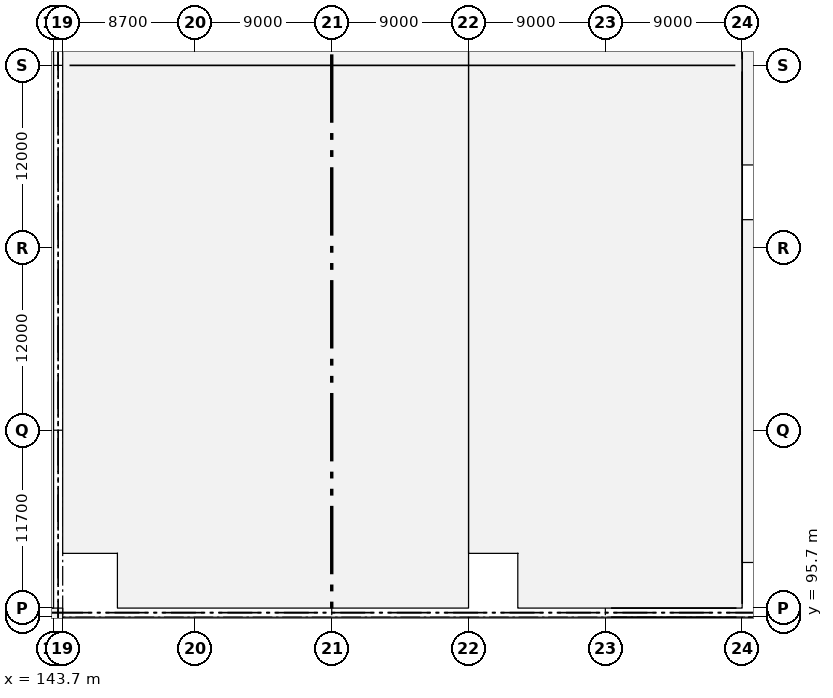
"""IFC4 building model, lengths in metres.
Left out: names, types, materials, properties, quantities, classifications, styles, units other than length and angle.
Written with IfcOpenShell. Run it as: python <this file> out.ifc"""

import sys

from ifc_helpers import new_model, si_unit, direction, frame, frame_2d, origin, origin_2d, place, context, subcontext, project, spatial, rectangle, extrude, element, fill, save


model = new_model("IFC4")
c1 = context("Model", 3, precision=1e-05, world=origin(), true_north=direction((0.0, 1.0)))
c2 = subcontext(c1, "Body", "Model", "MODEL_VIEW")
j1 = project(units=[si_unit("LENGTHUNIT", "METRE"), si_unit("PLANEANGLEUNIT", "RADIAN")], contexts=[c1])
p1 = place(None, origin())
s1 = spatial("IfcSite", under=j1, at=p1, CompositionType="ELEMENT")
p2 = place(p1, origin())
s2 = spatial("IfcBuilding", under=s1, at=p2, CompositionType="ELEMENT")
p3 = place(p2, origin())
s3 = spatial("IfcBuildingStorey", under=s2, at=p3, CompositionType="ELEMENT", Elevation=0.0)
p4 = place(p3, frame((143.7, 96.3, -0.5), z_axis=(0.0, 0.0, 1.0), x_axis=(1.0, 0.0, 0.0)))
e1 = element("IfcColumn", 1, at=p4, inside=s3, PredefinedType="COLUMN", context=c2, shape_type="SweptSolid", body=[
    extrude(rectangle(XDim=0.55, YDim=0.55, at=origin_2d()), origin(), (0.0, 0.0, 1.0), 6.8),
])
p5 = place(p3, frame((143.7, 132.0, -0.5), z_axis=(0.0, 0.0, 1.0), x_axis=(1.0, 0.0, 0.0)))
e2 = element("IfcColumn", 2, at=p5, inside=s3, PredefinedType="COLUMN", context=c2, shape_type="SweptSolid", body=[
    extrude(rectangle(XDim=0.55, YDim=0.75, at=origin_2d()), origin(), (0.0, 0.0, 1.0), 6.8),
])
for number, where, z_axis, x_axis in (
    (3, (144.3, 95.7, -0.5), (0.0, 0.0, 1.0), (1.0, 0.0, 0.0)),
    (4, (144.3, 96.3, -0.5), (0.0, 0.0, 1.0), (1.0, 0.0, 0.0)),
):
    element("IfcColumn", number, at=place(p3, frame(where, z_axis=z_axis, x_axis=x_axis)), inside=s3, PredefinedType="COLUMN", context=c2, shape_type="SweptSolid", body=[
        extrude(rectangle(XDim=0.55, YDim=0.55, at=origin_2d()), origin(), (0.0, 0.0, 1.0), 6.8),
    ])
p6 = place(p3, frame((144.3, 132.0, -0.5), z_axis=(0.0, 0.0, 1.0), x_axis=(1.0, 0.0, 0.0)))
e5 = element("IfcColumn", 5, at=p6, inside=s3, PredefinedType="COLUMN", context=c2, shape_type="SweptSolid", body=[
    extrude(rectangle(XDim=0.55, YDim=0.75, at=origin_2d()), origin(), (0.0, 0.0, 1.0), 6.8),
])
p7 = place(p3, frame((153.0, 96.3, -0.5), z_axis=(0.0, 0.0, 1.0), x_axis=(1.0, 0.0, 0.0)))
e6 = element("IfcColumn", 6, at=p7, inside=s3, PredefinedType="COLUMN", context=c2, shape_type="SweptSolid", body=[
    extrude(rectangle(XDim=0.75, YDim=0.55, at=origin_2d()), origin(), (0.0, 0.0, 1.0), 6.8),
])
p8 = place(p3, frame((153.0, 132.0, -0.5), z_axis=(0.0, 0.0, 1.0), x_axis=(1.0, 0.0, 0.0)))
e7 = element("IfcColumn", 7, at=p8, inside=s3, PredefinedType="COLUMN", context=c2, shape_type="SweptSolid", body=[
    extrude(rectangle(XDim=0.8, YDim=0.8, at=origin_2d()), origin(), (0.0, 0.0, 1.0), 6.8),
])
p9 = place(p3, frame((162.0, 96.3, -0.5), z_axis=(0.0, 0.0, 1.0), x_axis=(1.0, 0.0, 0.0)))
e8 = element("IfcColumn", 8, at=p9, inside=s3, PredefinedType="COLUMN", context=c2, shape_type="SweptSolid", body=[
    extrude(rectangle(XDim=0.75, YDim=0.55, at=origin_2d()), origin(), (0.0, 0.0, 1.0), 6.8),
])
p10 = place(p3, frame((162.0, 132.0, -0.5), z_axis=(0.0, 0.0, 1.0), x_axis=(1.0, 0.0, 0.0)))
e9 = element("IfcColumn", 9, at=p10, inside=s3, PredefinedType="COLUMN", context=c2, shape_type="SweptSolid", body=[
    extrude(rectangle(XDim=0.8, YDim=0.8, at=origin_2d()), origin(), (0.0, 0.0, 1.0), 6.8),
])
p11 = place(p3, frame((171.0, 96.3, -0.5), z_axis=(0.0, 0.0, 1.0), x_axis=(1.0, 0.0, 0.0)))
e10 = element("IfcColumn", 10, at=p11, inside=s3, PredefinedType="COLUMN", context=c2, shape_type="SweptSolid", body=[
    extrude(rectangle(XDim=0.75, YDim=0.55, at=origin_2d()), origin(), (0.0, 0.0, 1.0), 6.8),
])
p12 = place(p3, frame((171.0, 132.0, -0.5), z_axis=(0.0, 0.0, 1.0), x_axis=(1.0, 0.0, 0.0)))
e11 = element("IfcColumn", 11, at=p12, inside=s3, PredefinedType="COLUMN", context=c2, shape_type="SweptSolid", body=[
    extrude(rectangle(XDim=0.8, YDim=0.8, at=origin_2d()), origin(), (0.0, 0.0, 1.0), 6.8),
])
for number, where, z_axis, x_axis in (
    (12, (180.0, 95.7, -0.5), (0.0, 0.0, 1.0), (1.0, 0.0, 0.0)),
    (13, (180.0, 96.3, -0.5), (0.0, 0.0, 1.0), (1.0, 0.0, 0.0)),
):
    element("IfcColumn", number, at=place(p3, frame(where, z_axis=z_axis, x_axis=x_axis)), inside=s3, PredefinedType="COLUMN", context=c2, shape_type="SweptSolid", body=[
        extrude(rectangle(XDim=0.75, YDim=0.55, at=origin_2d()), origin(), (0.0, 0.0, 1.0), 6.8),
    ])
p13 = place(p3, frame((180.0, 132.0, -0.5), z_axis=(0.0, 0.0, 1.0), x_axis=(1.0, 0.0, 0.0)))
e14 = element("IfcColumn", 14, at=p13, inside=s3, PredefinedType="COLUMN", context=c2, shape_type="SweptSolid", body=[
    extrude(rectangle(XDim=0.8, YDim=0.8, at=origin_2d()), origin(), (0.0, 0.0, 1.0), 6.8),
])
for number, where, z_axis, x_axis in (
    (15, (189.0, 95.7, -0.5), (0.0, 0.0, 1.0), (1.0, 0.0, 0.0)),
    (16, (189.0, 96.3, -0.5), (0.0, 0.0, 1.0), (1.0, 0.0, 0.0)),
):
    element("IfcColumn", number, at=place(p3, frame(where, z_axis=z_axis, x_axis=x_axis)), inside=s3, PredefinedType="COLUMN", context=c2, shape_type="SweptSolid", body=[
        extrude(rectangle(XDim=0.75, YDim=0.55, at=origin_2d()), origin(), (0.0, 0.0, 1.0), 6.8),
    ])
p14 = place(p3, frame((189.0, 132.0, -0.5), z_axis=(0.0, 0.0, 1.0), x_axis=(1.0, 0.0, 0.0)))
e17 = element("IfcColumn", 17, at=p14, inside=s3, PredefinedType="COLUMN", context=c2, shape_type="SweptSolid", body=[
    extrude(rectangle(XDim=0.8, YDim=0.8, at=origin_2d()), origin(), (0.0, 0.0, 1.0), 6.8),
])
for number, where, z_axis, x_axis in (
    (18, (153.0, 108.0, -0.5), (0.0, 0.0, 1.0), (1.0, 0.0, 0.0)),
    (19, (171.0, 108.0, -0.5), (0.0, 0.0, 1.0), (1.0, 0.0, 0.0)),
    (20, (153.0, 120.0, -0.5), (0.0, 0.0, 1.0), (1.0, 0.0, 0.0)),
    (21, (171.0, 120.0, -0.5), (0.0, 0.0, 1.0), (1.0, 0.0, 0.0)),
    (22, (144.3, 108.0, -0.5), (0.0, 0.0, 1.0), (1.0, 0.0, 0.0)),
    (23, (144.3, 120.0, -0.5), (0.0, 0.0, 1.0), (1.0, 0.0, 0.0)),
    (24, (180.0, 108.0, -0.5), (0.0, 0.0, 1.0), (1.0, 0.0, 0.0)),
    (25, (180.0, 120.0, -0.5), (0.0, 0.0, 1.0), (1.0, 0.0, 0.0)),
):
    element("IfcColumn", number, at=place(p3, frame(where, z_axis=z_axis, x_axis=x_axis)), inside=s3, PredefinedType="COLUMN", context=c2, shape_type="SweptSolid", body=[
        extrude(rectangle(XDim=0.75, YDim=0.75, at=origin_2d()), origin(), (0.0, 0.0, 1.0), 6.8),
    ])
p15 = place(p3, frame((180.375, 96.3, 0.0), z_axis=(0.0, 0.0, 1.0), x_axis=(1.0, 0.0, 0.0)))
e26 = element("IfcWall", 26, at=p15, inside=s3, PredefinedType="SOLIDWALL", context=c2, shape_type="SweptSolid", body=[
    extrude(rectangle(XDim=8.25, YDim=0.34, at=frame_2d((4.125, 0.0))), origin(), (0.0, 0.0, 1.0), 5.1),
])
p16 = place(p15, frame((1.55, 0.0, 0.9)))
e27 = element("IfcOpeningElement", 27, at=p16, cuts=e26, PredefinedType="OPENING", context=c2, shape_type="SweptSolid", body=[
    extrude(rectangle(XDim=2.4, YDim=3.5, at=frame_2d((1.2, 1.75))), frame((0.0, 0.18, 0.0), z_axis=(0.0, -1.0, 0.0), x_axis=(1.0, 0.0, 0.0)), (0.0, 0.0, 1.0), 0.36),
])
p17 = place(p15, frame((4.3, 0.0, 0.9)))
e28 = element("IfcOpeningElement", 28, at=p17, cuts=e26, PredefinedType="OPENING", context=c2, shape_type="SweptSolid", body=[
    extrude(rectangle(XDim=2.4, YDim=3.5, at=frame_2d((1.2, 1.75))), frame((0.0, 0.18, 0.0), z_axis=(0.0, -1.0, 0.0), x_axis=(1.0, 0.0, 0.0)), (0.0, 0.0, 1.0), 0.36),
])
p18 = place(p3, frame((189.0, 96.575, 0.0), z_axis=(0.0, 0.0, 1.0), x_axis=(0.0, 1.0, 0.0)))
e29 = element("IfcWall", 29, at=p18, inside=s3, PredefinedType="SOLIDWALL", context=c2, shape_type="SweptSolid", body=[
    extrude(rectangle(XDim=11.425, YDim=0.34, at=frame_2d((5.712, 0.0))), origin(), (0.0, 0.0, 1.0), 6.3),
])
p19 = place(p18, frame((2.608, 0.0, 0.9)))
e30 = element("IfcOpeningElement", 30, at=p19, cuts=e29, PredefinedType="OPENING", context=c2, shape_type="SweptSolid", body=[
    extrude(rectangle(XDim=2.4, YDim=3.5, at=frame_2d((1.2, 1.75))), frame((0.0, 0.18, 0.0), z_axis=(0.0, -1.0, 0.0), x_axis=(1.0, 0.0, 0.0)), (0.0, 0.0, 1.0), 0.36),
])
p20 = place(p18, frame((6.417, 0.0, 0.9)))
e31 = element("IfcOpeningElement", 31, at=p20, cuts=e29, PredefinedType="OPENING", context=c2, shape_type="SweptSolid", body=[
    extrude(rectangle(XDim=2.4, YDim=3.5, at=frame_2d((1.2, 1.75))), frame((0.0, 0.18, 0.0), z_axis=(0.0, -1.0, 0.0), x_axis=(1.0, 0.0, 0.0)), (0.0, 0.0, 1.0), 0.36),
])
p21 = place(p3, frame((189.0, 108.0, 0.0), z_axis=(0.0, 0.0, 1.0), x_axis=(0.0, 1.0, 0.0)))
e32 = element("IfcWall", 32, at=p21, inside=s3, PredefinedType="SOLIDWALL", context=c2, shape_type="SweptSolid", body=[
    extrude(rectangle(XDim=12.0, YDim=0.34, at=frame_2d((6.0, 0.0))), origin(), (0.0, 0.0, 1.0), 6.3),
])
p22 = place(p21, frame((2.8, 0.0, 0.9)))
e33 = element("IfcOpeningElement", 33, at=p22, cuts=e32, PredefinedType="OPENING", context=c2, shape_type="SweptSolid", body=[
    extrude(rectangle(XDim=2.4, YDim=3.5, at=frame_2d((1.2, 1.75))), frame((0.0, 0.18, 0.0), z_axis=(0.0, -1.0, 0.0), x_axis=(1.0, 0.0, 0.0)), (0.0, 0.0, 1.0), 0.36),
])
p23 = place(p21, frame((6.8, 0.0, 0.9)))
e34 = element("IfcOpeningElement", 34, at=p23, cuts=e32, PredefinedType="OPENING", context=c2, shape_type="SweptSolid", body=[
    extrude(rectangle(XDim=2.4, YDim=3.5, at=frame_2d((1.2, 1.75))), frame((0.0, 0.18, 0.0), z_axis=(0.0, -1.0, 0.0), x_axis=(1.0, 0.0, 0.0)), (0.0, 0.0, 1.0), 0.36),
])
p24 = place(p3, frame((189.0, 120.0, 0.0), z_axis=(0.0, 0.0, 1.0), x_axis=(0.0, 1.0, 0.0)))
e35 = element("IfcWall", 35, at=p24, inside=s3, PredefinedType="SOLIDWALL", context=c2, shape_type="SweptSolid", body=[
    extrude(rectangle(XDim=11.6, YDim=0.34, at=frame_2d((5.8, 0.0))), origin(), (0.0, 0.0, 1.0), 6.3),
])
p25 = place(p24, frame((2.667, 0.0, 0.9)))
e36 = element("IfcOpeningElement", 36, at=p25, cuts=e35, PredefinedType="OPENING", context=c2, shape_type="SweptSolid", body=[
    extrude(rectangle(XDim=2.4, YDim=3.5, at=frame_2d((1.2, 1.75))), frame((0.0, 0.18, 0.0), z_axis=(0.0, -1.0, 0.0), x_axis=(1.0, 0.0, 0.0)), (0.0, 0.0, 1.0), 0.36),
])
p26 = place(p24, frame((6.533, 0.0, 0.9)))
e37 = element("IfcOpeningElement", 37, at=p26, cuts=e35, PredefinedType="OPENING", context=c2, shape_type="SweptSolid", body=[
    extrude(rectangle(XDim=2.4, YDim=3.5, at=frame_2d((1.2, 1.75))), frame((0.0, 0.18, 0.0), z_axis=(0.0, -1.0, 0.0), x_axis=(1.0, 0.0, 0.0)), (0.0, 0.0, 1.0), 0.36),
])
p27 = place(p3, frame((189.0, 132.4, 0.0), z_axis=(0.0, 0.0, 1.0), x_axis=(0.0, 1.0, 0.0)))
e38 = element("IfcWall", 38, at=p27, inside=s3, PredefinedType="SOLIDWALL", context=c2, shape_type="SweptSolid", body=[
    extrude(rectangle(XDim=11.25, YDim=0.34, at=frame_2d((5.625, 0.0))), origin(), (0.0, 0.0, 1.0), 4.97),
])
p28 = place(p27, frame((2.55, 0.0, 0.9)))
e39 = element("IfcOpeningElement", 39, at=p28, cuts=e38, PredefinedType="OPENING", context=c2, shape_type="SweptSolid", body=[
    extrude(rectangle(XDim=2.4, YDim=3.5, at=frame_2d((1.2, 1.75))), frame((0.0, 0.18, 0.0), z_axis=(0.0, -1.0, 0.0), x_axis=(1.0, 0.0, 0.0)), (0.0, 0.0, 1.0), 0.36),
])
p29 = place(p27, frame((6.3, 0.0, 0.9)))
e40 = element("IfcOpeningElement", 40, at=p29, cuts=e38, PredefinedType="OPENING", context=c2, shape_type="SweptSolid", body=[
    extrude(rectangle(XDim=2.4, YDim=3.5, at=frame_2d((1.2, 1.75))), frame((0.0, 0.18, 0.0), z_axis=(0.0, -1.0, 0.0), x_axis=(1.0, 0.0, 0.0)), (0.0, 0.0, 1.0), 0.36),
])
p30 = place(p3, frame((180.375, 95.7, 0.0), z_axis=(0.0, 0.0, 1.0), x_axis=(1.0, 0.0, 0.0)))
e41 = element("IfcWall", 41, at=p30, inside=s3, PredefinedType="SOLIDWALL", context=c2, shape_type="SweptSolid", body=[
    extrude(rectangle(XDim=8.25, YDim=0.34, at=frame_2d((4.125, 0.0))), origin(), (0.0, 0.0, 1.0), 5.1),
])
p31 = place(p30, frame((1.55, 0.0, 0.9)))
e42 = element("IfcOpeningElement", 42, at=p31, cuts=e41, PredefinedType="OPENING", context=c2, shape_type="SweptSolid", body=[
    extrude(rectangle(XDim=2.4, YDim=3.5, at=frame_2d((1.2, 1.75))), frame((0.0, 0.18, 0.0), z_axis=(0.0, -1.0, 0.0), x_axis=(1.0, 0.0, 0.0)), (0.0, 0.0, 1.0), 0.36),
])
p32 = place(p30, frame((4.3, 0.0, 0.9)))
e43 = element("IfcOpeningElement", 43, at=p32, cuts=e41, PredefinedType="OPENING", context=c2, shape_type="SweptSolid", body=[
    extrude(rectangle(XDim=2.4, YDim=3.5, at=frame_2d((1.2, 1.75))), frame((0.0, 0.18, 0.0), z_axis=(0.0, -1.0, 0.0), x_axis=(1.0, 0.0, 0.0)), (0.0, 0.0, 1.0), 0.36),
])
p33 = place(p3, frame((189.375, 95.7, 0.0), z_axis=(0.0, 0.0, 1.0), x_axis=(1.0, 0.0, 0.0)))
e44 = element("IfcWall", 44, at=p33, inside=s3, PredefinedType="SOLIDWALL", context=c2, shape_type="SweptSolid", body=[
    extrude(rectangle(XDim=8.25, YDim=0.34, at=frame_2d((4.125, 0.0))), origin(), (0.0, 0.0, 1.0), 5.1),
])
p34 = place(p33, frame((1.55, 0.0, 0.9)))
e45 = element("IfcOpeningElement", 45, at=p34, cuts=e44, PredefinedType="OPENING", context=c2, shape_type="SweptSolid", body=[
    extrude(rectangle(XDim=2.4, YDim=3.5, at=frame_2d((1.2, 1.75))), frame((0.0, 0.18, 0.0), z_axis=(0.0, -1.0, 0.0), x_axis=(1.0, 0.0, 0.0)), (0.0, 0.0, 1.0), 0.36),
])
p35 = place(p33, frame((4.3, 0.0, 0.9)))
e46 = element("IfcOpeningElement", 46, at=p35, cuts=e44, PredefinedType="OPENING", context=c2, shape_type="SweptSolid", body=[
    extrude(rectangle(XDim=2.4, YDim=3.5, at=frame_2d((1.2, 1.75))), frame((0.0, 0.18, 0.0), z_axis=(0.0, -1.0, 0.0), x_axis=(1.0, 0.0, 0.0)), (0.0, 0.0, 1.0), 0.36),
])
p36 = place(p3, frame((144.75, 132.0, 0.0), z_axis=(0.0, 0.0, 1.0), x_axis=(1.0, 0.0, 0.0)))
e47 = element("IfcWall", 47, at=p36, inside=s3, PredefinedType="PARTITIONING", context=c2, shape_type="SweptSolid", body=[
    extrude(rectangle(XDim=43.8, YDim=0.125, at=frame_2d((21.9, 0.0))), origin(), (0.0, 0.0, 1.0), 5.27),
])
p37 = place(p36, frame((12.25, 0.0, 0.0)))
e48 = element("IfcOpeningElement", 48, at=p37, cuts=e47, PredefinedType="OPENING", context=c2, shape_type="SweptSolid", body=[
    extrude(rectangle(XDim=1.0, YDim=2.15, at=frame_2d((0.5, 1.075))), frame((0.0, 0.073, 0.0), z_axis=(0.0, -1.0, 0.0), x_axis=(1.0, 0.0, 0.0)), (0.0, 0.0, 1.0), 0.145),
])
p38 = place(p16, origin())
e49 = element("IfcWindow", 49, at=p38, inside=s3, PartitioningType="TRIPLE_PANEL_VERTICAL", PredefinedType="WINDOW", context=c2, shape_type="SweptSolid", body=[
    extrude(rectangle(XDim=2.4, YDim=3.5, at=frame_2d((1.2, 1.75))), frame((0.0, 0.03, 0.0), z_axis=(0.0, -1.0, 0.0), x_axis=(1.0, 0.0, 0.0)), (0.0, 0.0, 1.0), 0.06),
])
fill(e27, e49)
p39 = place(p17, origin())
e50 = element("IfcWindow", 50, at=p39, inside=s3, PartitioningType="TRIPLE_PANEL_VERTICAL", PredefinedType="WINDOW", context=c2, shape_type="SweptSolid", body=[
    extrude(rectangle(XDim=2.4, YDim=3.5, at=frame_2d((1.2, 1.75))), frame((0.0, 0.03, 0.0), z_axis=(0.0, -1.0, 0.0), x_axis=(1.0, 0.0, 0.0)), (0.0, 0.0, 1.0), 0.06),
])
fill(e28, e50)
p40 = place(p19, origin())
e51 = element("IfcWindow", 51, at=p40, inside=s3, PartitioningType="TRIPLE_PANEL_VERTICAL", PredefinedType="WINDOW", context=c2, shape_type="SweptSolid", body=[
    extrude(rectangle(XDim=2.4, YDim=3.5, at=frame_2d((1.2, 1.75))), frame((0.0, 0.03, 0.0), z_axis=(0.0, -1.0, 0.0), x_axis=(1.0, 0.0, 0.0)), (0.0, 0.0, 1.0), 0.06),
])
fill(e30, e51)
p41 = place(p20, origin())
e52 = element("IfcWindow", 52, at=p41, inside=s3, PartitioningType="TRIPLE_PANEL_VERTICAL", PredefinedType="WINDOW", context=c2, shape_type="SweptSolid", body=[
    extrude(rectangle(XDim=2.4, YDim=3.5, at=frame_2d((1.2, 1.75))), frame((0.0, 0.03, 0.0), z_axis=(0.0, -1.0, 0.0), x_axis=(1.0, 0.0, 0.0)), (0.0, 0.0, 1.0), 0.06),
])
fill(e31, e52)
p42 = place(p22, origin())
e53 = element("IfcWindow", 53, at=p42, inside=s3, PartitioningType="TRIPLE_PANEL_VERTICAL", PredefinedType="WINDOW", context=c2, shape_type="SweptSolid", body=[
    extrude(rectangle(XDim=2.4, YDim=3.5, at=frame_2d((1.2, 1.75))), frame((0.0, 0.03, 0.0), z_axis=(0.0, -1.0, 0.0), x_axis=(1.0, 0.0, 0.0)), (0.0, 0.0, 1.0), 0.06),
])
fill(e33, e53)
p43 = place(p23, origin())
e54 = element("IfcWindow", 54, at=p43, inside=s3, PartitioningType="TRIPLE_PANEL_VERTICAL", PredefinedType="WINDOW", context=c2, shape_type="SweptSolid", body=[
    extrude(rectangle(XDim=2.4, YDim=3.5, at=frame_2d((1.2, 1.75))), frame((0.0, 0.03, 0.0), z_axis=(0.0, -1.0, 0.0), x_axis=(1.0, 0.0, 0.0)), (0.0, 0.0, 1.0), 0.06),
])
fill(e34, e54)
p44 = place(p25, origin())
e55 = element("IfcWindow", 55, at=p44, inside=s3, PartitioningType="TRIPLE_PANEL_VERTICAL", PredefinedType="WINDOW", context=c2, shape_type="SweptSolid", body=[
    extrude(rectangle(XDim=2.4, YDim=3.5, at=frame_2d((1.2, 1.75))), frame((0.0, 0.03, 0.0), z_axis=(0.0, -1.0, 0.0), x_axis=(1.0, 0.0, 0.0)), (0.0, 0.0, 1.0), 0.06),
])
fill(e36, e55)
p45 = place(p26, origin())
e56 = element("IfcWindow", 56, at=p45, inside=s3, PartitioningType="TRIPLE_PANEL_VERTICAL", PredefinedType="WINDOW", context=c2, shape_type="SweptSolid", body=[
    extrude(rectangle(XDim=2.4, YDim=3.5, at=frame_2d((1.2, 1.75))), frame((0.0, 0.03, 0.0), z_axis=(0.0, -1.0, 0.0), x_axis=(1.0, 0.0, 0.0)), (0.0, 0.0, 1.0), 0.06),
])
fill(e37, e56)
p46 = place(p31, origin())
e57 = element("IfcWindow", 57, at=p46, inside=s3, PartitioningType="TRIPLE_PANEL_VERTICAL", PredefinedType="WINDOW", context=c2, shape_type="SweptSolid", body=[
    extrude(rectangle(XDim=2.4, YDim=3.5, at=frame_2d((1.2, 1.75))), frame((0.0, 0.03, 0.0), z_axis=(0.0, -1.0, 0.0), x_axis=(1.0, 0.0, 0.0)), (0.0, 0.0, 1.0), 0.06),
])
fill(e42, e57)
p47 = place(p32, origin())
e58 = element("IfcWindow", 58, at=p47, inside=s3, PartitioningType="TRIPLE_PANEL_VERTICAL", PredefinedType="WINDOW", context=c2, shape_type="SweptSolid", body=[
    extrude(rectangle(XDim=2.4, YDim=3.5, at=frame_2d((1.2, 1.75))), frame((0.0, 0.03, 0.0), z_axis=(0.0, -1.0, 0.0), x_axis=(1.0, 0.0, 0.0)), (0.0, 0.0, 1.0), 0.06),
])
fill(e43, e58)
p48 = place(p37, origin())
e59 = element("IfcDoor", 59, at=p48, inside=s3, OperationType="SINGLE_SWING_LEFT", PredefinedType="DOOR", context=c2, shape_type="SweptSolid", body=[
    extrude(rectangle(XDim=1.0, YDim=2.15, at=frame_2d((0.5, 1.075))), frame((0.0, 0.025, 0.0), z_axis=(0.0, -1.0, 0.0), x_axis=(1.0, 0.0, 0.0)), (0.0, 0.0, 1.0), 0.05),
])
fill(e48, e59)
save(model, sys.argv[1])
